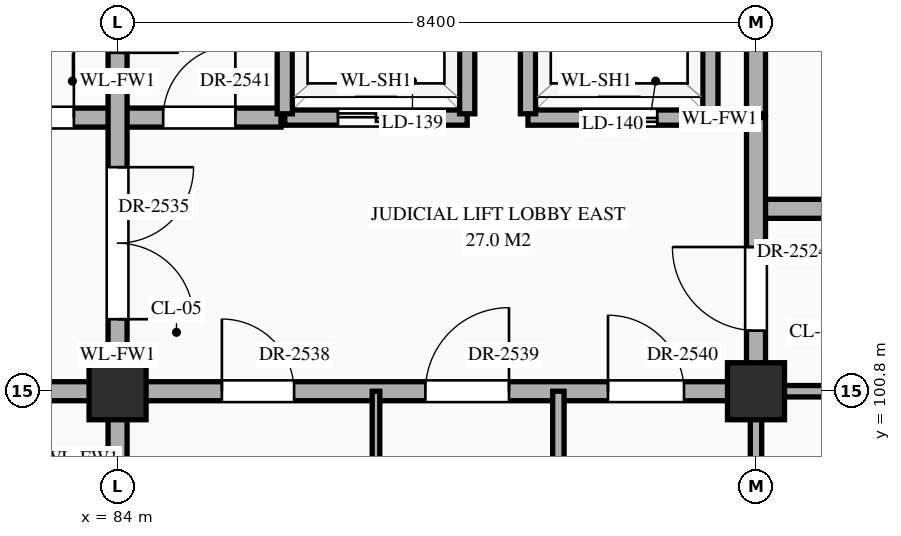
"""IFC4 building model, lengths in metres.
Left out: names, types, materials, properties, quantities, classifications, styles, units other than length and angle.
Written with IfcOpenShell. Run it as: python <this file> out.ifc"""

import sys

from ifc_helpers import new_model, si_unit, direction, frame, frame_2d, origin, origin_2d, place, context, subcontext, project, spatial, rectangle, extrude, element, fill, save


model = new_model("IFC4")
c1 = context("Model", 3, precision=1e-05, world=origin(), true_north=direction((0.0, 1.0)))
c2 = subcontext(c1, "Body", "Model", "MODEL_VIEW")
j1 = project(units=[si_unit("LENGTHUNIT", "METRE"), si_unit("PLANEANGLEUNIT", "RADIAN")], contexts=[c1])
p1 = place(None, origin())
s1 = spatial("IfcSite", under=j1, at=p1, CompositionType="ELEMENT")
p2 = place(p1, origin())
s2 = spatial("IfcBuilding", under=s1, at=p2, CompositionType="ELEMENT")
p3 = place(p2, frame((0.0, 0.0, 35.1)))
s3 = spatial("IfcBuildingStorey", under=s2, at=p3, CompositionType="ELEMENT", Elevation=35.1)
for number, where, z_axis, x_axis in (
    (1, (84.0, 100.8, 0.0), (0.0, 0.0, 1.0), (1.0, 0.0, 0.0)),
    (2, (92.4, 100.8, 0.0), (0.0, 0.0, 1.0), (1.0, 0.0, 0.0)),
):
    element("IfcColumn", number, at=place(p3, frame(where, z_axis=z_axis, x_axis=x_axis)), inside=s3, PredefinedType="COLUMN", context=c2, shape_type="SweptSolid", body=[
        extrude(rectangle(XDim=0.75, YDim=0.75, at=origin_2d()), origin(), (0.0, 0.0, 1.0), 4.2),
    ])
p4 = place(p3, frame((75.6, 100.8, 0.0), z_axis=(0.0, 0.0, 1.0), x_axis=(1.0, 0.0, 0.0)))
e3 = element("IfcWall", 3, at=p4, inside=s3, PredefinedType="STANDARD", context=c2, shape_type="SweptSolid", body=[
    extrude(rectangle(XDim=16.8, YDim=0.25, at=frame_2d((8.4, 0.0))), origin(), (0.0, 0.0, 1.0), 3.1),
])
p5 = place(p4, frame((3.65, 0.0, 0.0)))
e4 = element("IfcOpeningElement", 4, at=p5, cuts=e3, PredefinedType="OPENING", context=c2, shape_type="SweptSolid", body=[
    extrude(rectangle(XDim=1.1, YDim=2.2, at=frame_2d((0.55, 1.1))), frame((0.0, 0.137, 0.0), z_axis=(0.0, -1.0, 0.0), x_axis=(1.0, 0.0, 0.0)), (0.0, 0.0, 1.0), 0.274),
])
p6 = place(p4, frame((9.772, 0.0, 0.0)))
e5 = element("IfcOpeningElement", 5, at=p6, cuts=e3, PredefinedType="OPENING", context=c2, shape_type="SweptSolid", body=[
    extrude(rectangle(XDim=0.95, YDim=2.15, at=frame_2d((0.475, 1.075))), frame((0.0, 0.137, 0.0), z_axis=(0.0, -1.0, 0.0), x_axis=(1.0, 0.0, 0.0)), (0.0, 0.0, 1.0), 0.274),
])
p7 = place(p4, frame((12.45, 0.0, 0.0)))
e6 = element("IfcOpeningElement", 6, at=p7, cuts=e3, PredefinedType="OPENING", context=c2, shape_type="SweptSolid", body=[
    extrude(rectangle(XDim=1.1, YDim=2.2, at=frame_2d((0.55, 1.1))), frame((0.0, 0.137, 0.0), z_axis=(0.0, -1.0, 0.0), x_axis=(1.0, 0.0, 0.0)), (0.0, 0.0, 1.0), 0.274),
])
p8 = place(p4, frame((14.853, 0.0, 0.0)))
e7 = element("IfcOpeningElement", 7, at=p8, cuts=e3, PredefinedType="OPENING", context=c2, shape_type="SweptSolid", body=[
    extrude(rectangle(XDim=1.0, YDim=2.2, at=frame_2d((0.5, 1.1))), frame((0.0, 0.137, 0.0), z_axis=(0.0, -1.0, 0.0), x_axis=(1.0, 0.0, 0.0)), (0.0, 0.0, 1.0), 0.274),
])
p9 = place(p3, frame((92.4, 100.8, 0.0), z_axis=(0.0, 0.0, 1.0), x_axis=(1.0, 0.0, 0.0)))
e8 = element("IfcWall", 8, at=p9, inside=s3, PredefinedType="STANDARD", context=c2, shape_type="SweptSolid", body=[
    extrude(rectangle(XDim=4.2, YDim=0.15, at=frame_2d((2.1, 0.0))), origin(), (0.0, 0.0, 1.0), 3.1),
])
p10 = place(p9, frame((1.798, 0.0, 0.0)))
e9 = element("IfcOpeningElement", 9, at=p10, cuts=e8, PredefinedType="OPENING", context=c2, shape_type="SweptSolid", body=[
    extrude(rectangle(XDim=0.9, YDim=2.15, at=frame_2d((0.45, 1.075))), frame((0.0, 0.087, 0.0), z_axis=(0.0, -1.0, 0.0), x_axis=(1.0, 0.0, 0.0)), (0.0, 0.0, 1.0), 0.174),
])
p11 = place(p3, frame((92.4, 103.2, 0.0), z_axis=(0.0, 0.0, 1.0), x_axis=(1.0, 0.0, 0.0)))
e10 = element("IfcWall", 10, at=p11, inside=s3, PredefinedType="STANDARD", context=c2, shape_type="SweptSolid", body=[
    extrude(rectangle(XDim=4.2, YDim=0.25, at=frame_2d((2.1, 0.0))), origin(), (0.0, 0.0, 1.0), 3.95),
])
p12 = place(p11, frame((1.6, 0.0, 0.0)))
e11 = element("IfcOpeningElement", 11, at=p12, cuts=e10, PredefinedType="OPENING", context=c2, shape_type="SweptSolid", body=[
    extrude(rectangle(XDim=1.0, YDim=2.2, at=frame_2d((0.5, 1.1))), frame((0.0, 0.137, 0.0), z_axis=(0.0, -1.0, 0.0), x_axis=(1.0, 0.0, 0.0)), (0.0, 0.0, 1.0), 0.274),
])
p13 = place(p3, frame((81.85, 104.4, 0.0), z_axis=(0.0, 0.0, 1.0), x_axis=(1.0, 0.0, 0.0)))
e12 = element("IfcWall", 12, at=p13, inside=s3, PredefinedType="STANDARD", context=c2, shape_type="SweptSolid", body=[
    extrude(rectangle(XDim=4.3, YDim=0.25, at=frame_2d((2.15, 0.0))), origin(), (0.0, 0.0, 1.0), 3.95),
])
p14 = place(p13, frame((0.575, 0.0, 0.0)))
e13 = element("IfcOpeningElement", 13, at=p14, cuts=e12, PredefinedType="OPENING", context=c2, shape_type="SweptSolid", body=[
    extrude(rectangle(XDim=1.0, YDim=2.2, at=frame_2d((0.5, 1.1))), frame((0.0, 0.137, 0.0), z_axis=(0.0, -1.0, 0.0), x_axis=(1.0, 0.0, 0.0)), (0.0, 0.0, 1.0), 0.274),
])
p15 = place(p13, frame((2.75, 0.0, 0.0)))
e14 = element("IfcOpeningElement", 14, at=p15, cuts=e12, PredefinedType="OPENING", context=c2, shape_type="SweptSolid", body=[
    extrude(rectangle(XDim=0.95, YDim=2.15, at=frame_2d((0.475, 1.075))), frame((0.0, 0.137, 0.0), z_axis=(0.0, -1.0, 0.0), x_axis=(1.0, 0.0, 0.0)), (0.0, 0.0, 1.0), 0.274),
])
p16 = place(p3, frame((86.2, 104.4, 0.0), z_axis=(0.0, 0.0, 1.0), x_axis=(1.0, 0.0, 0.0)))
e15 = element("IfcWall", 15, at=p16, inside=s3, PredefinedType="STANDARD", context=c2, shape_type="SweptSolid", body=[
    extrude(rectangle(XDim=2.4, YDim=0.2, at=frame_2d((1.2, 0.0))), origin(), (0.0, 0.0, 1.0), 3.95),
])
p17 = place(p16, frame((0.7, 0.0, 0.0)))
e16 = element("IfcOpeningElement", 16, at=p17, cuts=e15, PredefinedType="OPENING", context=c2, shape_type="SweptSolid", body=[
    extrude(rectangle(XDim=1.0, YDim=2.15, at=frame_2d((0.5, 1.075))), frame((0.0, 0.112, 0.0), z_axis=(0.0, -1.0, 0.0), x_axis=(1.0, 0.0, 0.0)), (0.0, 0.0, 1.0), 0.224),
])
p18 = place(p3, frame((89.4, 104.4, 0.0), z_axis=(0.0, 0.0, 1.0), x_axis=(1.0, 0.0, 0.0)))
e17 = element("IfcWall", 17, at=p18, inside=s3, PredefinedType="STANDARD", context=c2, shape_type="SweptSolid", body=[
    extrude(rectangle(XDim=2.4, YDim=0.2, at=frame_2d((1.2, 0.0))), origin(), (0.0, 0.0, 1.0), 3.95),
])
p19 = place(p18, frame((0.7, 0.0, 0.0)))
e18 = element("IfcOpeningElement", 18, at=p19, cuts=e17, PredefinedType="OPENING", context=c2, shape_type="SweptSolid", body=[
    extrude(rectangle(XDim=1.0, YDim=2.15, at=frame_2d((0.5, 1.075))), frame((0.0, 0.112, 0.0), z_axis=(0.0, -1.0, 0.0), x_axis=(1.0, 0.0, 0.0)), (0.0, 0.0, 1.0), 0.224),
])
p20 = place(p3, frame((84.0, 84.65, 0.0), z_axis=(0.0, 0.0, 1.0), x_axis=(0.0, 1.0, 0.0)))
e19 = element("IfcWall", 19, at=p20, inside=s3, PredefinedType="STANDARD", context=c2, shape_type="SweptSolid", body=[
    extrude(rectangle(XDim=30.51, YDim=0.25, at=frame_2d((15.255, 0.0))), origin(), (0.0, 0.0, 1.0), 3.2),
])
p21 = place(p20, frame((17.097, 0.0, 0.0)))
e20 = element("IfcOpeningElement", 20, at=p21, cuts=e19, PredefinedType="OPENING", context=c2, shape_type="SweptSolid", body=[
    extrude(rectangle(XDim=2.0, YDim=2.4, at=frame_2d((1.0, 1.2))), frame((0.0, 0.137, 0.0), z_axis=(0.0, -1.0, 0.0), x_axis=(1.0, 0.0, 0.0)), (0.0, 0.0, 1.0), 0.274),
])
p22 = place(p20, frame((7.127, 0.0, 0.0)))
e21 = element("IfcOpeningElement", 21, at=p22, cuts=e19, PredefinedType="OPENING", context=c2, shape_type="SweptSolid", body=[
    extrude(rectangle(XDim=0.95, YDim=2.15, at=frame_2d((0.475, 1.075))), frame((0.0, 0.137, 0.0), z_axis=(0.0, -1.0, 0.0), x_axis=(1.0, 0.0, 0.0)), (0.0, 0.0, 1.0), 0.274),
])
p23 = place(p20, frame((9.823, 0.0, 0.0)))
e22 = element("IfcOpeningElement", 22, at=p23, cuts=e19, PredefinedType="OPENING", context=c2, shape_type="SweptSolid", body=[
    extrude(rectangle(XDim=0.95, YDim=2.15, at=frame_2d((0.475, 1.075))), frame((0.0, 0.137, 0.0), z_axis=(0.0, -1.0, 0.0), x_axis=(1.0, 0.0, 0.0)), (0.0, 0.0, 1.0), 0.274),
])
p24 = place(p20, frame((20.603, 0.0, 0.0)))
e23 = element("IfcOpeningElement", 23, at=p24, cuts=e19, PredefinedType="OPENING", context=c2, shape_type="SweptSolid", body=[
    extrude(rectangle(XDim=1.6, YDim=2.3, at=frame_2d((0.8, 1.15))), frame((0.0, 0.137, 0.0), z_axis=(0.0, -1.0, 0.0), x_axis=(1.0, 0.0, 0.0)), (0.0, 0.0, 1.0), 0.274),
])
p25 = place(p20, frame((23.873, 0.0, 0.0)))
e24 = element("IfcOpeningElement", 24, at=p25, cuts=e19, PredefinedType="OPENING", context=c2, shape_type="SweptSolid", body=[
    extrude(rectangle(XDim=1.0, YDim=2.2, at=frame_2d((0.5, 1.1))), frame((0.0, 0.137, 0.0), z_axis=(0.0, -1.0, 0.0), x_axis=(1.0, 0.0, 0.0)), (0.0, 0.0, 1.0), 0.274),
])
p26 = place(p20, frame((0.228, 0.0, 0.0)))
e25 = element("IfcOpeningElement", 25, at=p26, cuts=e19, PredefinedType="OPENING", context=c2, shape_type="SweptSolid", body=[
    extrude(rectangle(XDim=1.0, YDim=2.2, at=frame_2d((0.5, 1.1))), frame((0.0, 0.137, 0.0), z_axis=(0.0, -1.0, 0.0), x_axis=(1.0, 0.0, 0.0)), (0.0, 0.0, 1.0), 0.274),
])
p27 = place(p3, frame((86.2, 104.45, 0.0), z_axis=(0.0, 0.0, 1.0), x_axis=(0.0, 1.0, 0.0)))
e26 = element("IfcWall", 26, at=p27, inside=s3, PredefinedType="STANDARD", context=c2, shape_type="SweptSolid", body=[
    extrude(rectangle(XDim=2.3, YDim=0.2, at=frame_2d((1.15, 0.0))), origin(), (0.0, 0.0, 1.0), 3.95),
])
p28 = place(p3, frame((87.4, 96.0, 0.0), z_axis=(0.0, 0.0, 1.0), x_axis=(0.0, 1.0, 0.0)))
e27 = element("IfcWall", 27, at=p28, inside=s3, PredefinedType="STANDARD", context=c2, shape_type="SweptSolid", body=[
    extrude(rectangle(XDim=4.8, YDim=0.1, at=frame_2d((2.4, 0.0))), origin(), (0.0, 0.0, 1.0), 3.95),
])
p29 = place(p28, frame((1.95, 0.0, 0.0)))
e28 = element("IfcOpeningElement", 28, at=p29, cuts=e27, PredefinedType="OPENING", context=c2, shape_type="SweptSolid", body=[
    extrude(rectangle(XDim=0.9, YDim=2.15, at=frame_2d((0.45, 1.075))), frame((0.0, 0.062, 0.0), z_axis=(0.0, -1.0, 0.0), x_axis=(1.0, 0.0, 0.0)), (0.0, 0.0, 1.0), 0.124),
])
for number, where, z_axis, x_axis in (
    (29, (88.6, 104.45, 0.0), (0.0, 0.0, 1.0), (0.0, 1.0, 0.0)),
    (30, (89.4, 104.45, 0.0), (0.0, 0.0, 1.0), (0.0, 1.0, 0.0)),
):
    element("IfcWall", number, at=place(p3, frame(where, z_axis=z_axis, x_axis=x_axis)), inside=s3, PredefinedType="STANDARD", context=c2, shape_type="SweptSolid", body=[
        extrude(rectangle(XDim=2.3, YDim=0.2, at=frame_2d((1.15, 0.0))), origin(), (0.0, 0.0, 1.0), 3.95),
    ])
p30 = place(p3, frame((89.8, 96.0, 0.0), z_axis=(0.0, 0.0, 1.0), x_axis=(0.0, 1.0, 0.0)))
e31 = element("IfcWall", 31, at=p30, inside=s3, PredefinedType="STANDARD", context=c2, shape_type="SweptSolid", body=[
    extrude(rectangle(XDim=4.8, YDim=0.15, at=frame_2d((2.4, 0.0))), origin(), (0.0, 0.0, 1.0), 3.95),
])
p31 = place(p30, frame((1.97, 0.0, 0.0)))
e32 = element("IfcOpeningElement", 32, at=p31, cuts=e31, PredefinedType="OPENING", context=c2, shape_type="SweptSolid", body=[
    extrude(rectangle(XDim=0.86, YDim=2.1, at=frame_2d((0.43, 1.05))), frame((0.0, 0.087, 0.0), z_axis=(0.0, -1.0, 0.0), x_axis=(1.0, 0.0, 0.0)), (0.0, 0.0, 1.0), 0.174),
])
p32 = place(p3, frame((91.8, 104.45, 0.0), z_axis=(0.0, 0.0, 1.0), x_axis=(0.0, 1.0, 0.0)))
e33 = element("IfcWall", 33, at=p32, inside=s3, PredefinedType="STANDARD", context=c2, shape_type="SweptSolid", body=[
    extrude(rectangle(XDim=2.3, YDim=0.2, at=frame_2d((1.15, 0.0))), origin(), (0.0, 0.0, 1.0), 3.95),
])
p33 = place(p3, frame((92.4, 96.0, 0.0), z_axis=(0.0, 0.0, 1.0), x_axis=(0.0, 1.0, 0.0)))
e34 = element("IfcWall", 34, at=p33, inside=s3, PredefinedType="STANDARD", context=c2, shape_type="SweptSolid", body=[
    extrude(rectangle(XDim=4.8, YDim=0.15, at=frame_2d((2.4, 0.0))), origin(), (0.0, 0.0, 1.0), 3.2),
])
p34 = place(p3, frame((92.4, 100.8, 0.0), z_axis=(0.0, 0.0, 1.0), x_axis=(0.0, 1.0, 0.0)))
e35 = element("IfcWall", 35, at=p34, inside=s3, PredefinedType="STANDARD", context=c2, shape_type="SweptSolid", body=[
    extrude(rectangle(XDim=3.6, YDim=0.25, at=frame_2d((1.8, 0.0))), origin(), (0.0, 0.0, 1.0), 3.2),
])
p35 = place(p34, frame((0.798, 0.0, 0.0)))
e36 = element("IfcOpeningElement", 36, at=p35, cuts=e35, PredefinedType="OPENING", context=c2, shape_type="SweptSolid", body=[
    extrude(rectangle(XDim=1.1, YDim=2.2, at=frame_2d((0.55, 1.1))), frame((0.0, 0.137, 0.0), z_axis=(0.0, -1.0, 0.0), x_axis=(1.0, 0.0, 0.0)), (0.0, 0.0, 1.0), 0.274),
])
p36 = place(p3, frame((92.4, 104.45, 0.0), z_axis=(0.0, 0.0, 1.0), x_axis=(0.0, 1.0, 0.0)))
e37 = element("IfcWall", 37, at=p36, inside=s3, PredefinedType="STANDARD", context=c2, shape_type="SweptSolid", body=[
    extrude(rectangle(XDim=3.5, YDim=0.25, at=frame_2d((1.75, 0.0))), origin(), (0.0, 0.0, 1.0), 3.2),
])
p37 = place(p17, origin())
e38 = element("IfcDoor", 38, at=p37, inside=s3, OperationType="DOUBLE_DOOR_SLIDING", PredefinedType="DOOR", context=c2, shape_type="SweptSolid", body=[
    extrude(rectangle(XDim=1.0, YDim=2.15, at=frame_2d((0.5, 1.075))), frame((0.0, 0.025, 0.0), z_axis=(0.0, -1.0, 0.0), x_axis=(1.0, 0.0, 0.0)), (0.0, 0.0, 1.0), 0.05),
])
fill(e16, e38)
p38 = place(p19, origin())
e39 = element("IfcDoor", 39, at=p38, inside=s3, OperationType="DOUBLE_DOOR_SLIDING", PredefinedType="DOOR", context=c2, shape_type="SweptSolid", body=[
    extrude(rectangle(XDim=1.0, YDim=2.15, at=frame_2d((0.5, 1.075))), frame((0.0, 0.025, 0.0), z_axis=(0.0, -1.0, 0.0), x_axis=(1.0, 0.0, 0.0)), (0.0, 0.0, 1.0), 0.05),
])
fill(e18, e39)
p39 = place(p35, origin())
e40 = element("IfcDoor", 40, at=p39, inside=s3, OperationType="SINGLE_SWING_RIGHT", PredefinedType="DOOR", context=c2, shape_type="SweptSolid", body=[
    extrude(rectangle(XDim=1.1, YDim=2.2, at=frame_2d((0.55, 1.1))), frame((0.0, 0.025, 0.0), z_axis=(0.0, -1.0, 0.0), x_axis=(1.0, 0.0, 0.0)), (0.0, 0.0, 1.0), 0.05),
])
fill(e36, e40)
p40 = place(p21, frame((2.0, 0.0, 0.0), z_axis=(0.0, 0.0, 1.0), x_axis=(-1.0, 0.0, 0.0)))
e41 = element("IfcDoor", 41, at=p40, inside=s3, OperationType="DOUBLE_DOOR_SINGLE_SWING", PredefinedType="DOOR", context=c2, shape_type="SweptSolid", body=[
    extrude(rectangle(XDim=2.0, YDim=2.4, at=frame_2d((1.0, 1.2))), frame((0.0, 0.025, 0.0), z_axis=(0.0, -1.0, 0.0), x_axis=(1.0, 0.0, 0.0)), (0.0, 0.0, 1.0), 0.05),
])
fill(e20, e41)
p41 = place(p14, origin())
e42 = element("IfcDoor", 42, at=p41, inside=s3, OperationType="SINGLE_SWING_RIGHT", PredefinedType="DOOR", context=c2, shape_type="SweptSolid", body=[
    extrude(rectangle(XDim=1.0, YDim=2.2, at=frame_2d((0.5, 1.1))), frame((0.0, 0.025, 0.0), z_axis=(0.0, -1.0, 0.0), x_axis=(1.0, 0.0, 0.0)), (0.0, 0.0, 1.0), 0.05),
])
fill(e13, e42)
p42 = place(p6, origin())
e43 = element("IfcDoor", 43, at=p42, inside=s3, OperationType="SINGLE_SWING_LEFT", PredefinedType="DOOR", context=c2, shape_type="SweptSolid", body=[
    extrude(rectangle(XDim=0.95, YDim=2.15, at=frame_2d((0.475, 1.075))), frame((0.0, 0.025, 0.0), z_axis=(0.0, -1.0, 0.0), x_axis=(1.0, 0.0, 0.0)), (0.0, 0.0, 1.0), 0.05),
])
fill(e5, e43)
p43 = place(p7, origin())
e44 = element("IfcDoor", 44, at=p43, inside=s3, OperationType="SINGLE_SWING_RIGHT", PredefinedType="DOOR", context=c2, shape_type="SweptSolid", body=[
    extrude(rectangle(XDim=1.1, YDim=2.2, at=frame_2d((0.55, 1.1))), frame((0.0, 0.025, 0.0), z_axis=(0.0, -1.0, 0.0), x_axis=(1.0, 0.0, 0.0)), (0.0, 0.0, 1.0), 0.05),
])
fill(e6, e44)
p44 = place(p8, origin())
e45 = element("IfcDoor", 45, at=p44, inside=s3, OperationType="SINGLE_SWING_LEFT", PredefinedType="DOOR", context=c2, shape_type="SweptSolid", body=[
    extrude(rectangle(XDim=1.0, YDim=2.2, at=frame_2d((0.5, 1.1))), frame((0.0, 0.025, 0.0), z_axis=(0.0, -1.0, 0.0), x_axis=(1.0, 0.0, 0.0)), (0.0, 0.0, 1.0), 0.05),
])
fill(e7, e45)
p45 = place(p15, origin())
e46 = element("IfcDoor", 46, at=p45, inside=s3, OperationType="SINGLE_SWING_RIGHT", PredefinedType="DOOR", context=c2, shape_type="SweptSolid", body=[
    extrude(rectangle(XDim=0.95, YDim=2.15, at=frame_2d((0.475, 1.075))), frame((0.0, 0.025, 0.0), z_axis=(0.0, -1.0, 0.0), x_axis=(1.0, 0.0, 0.0)), (0.0, 0.0, 1.0), 0.05),
])
fill(e14, e46)
p46 = place(p24, frame((1.6, 0.0, 0.0), z_axis=(0.0, 0.0, 1.0), x_axis=(-1.0, 0.0, 0.0)))
e47 = element("IfcDoor", 47, at=p46, inside=s3, OperationType="DOUBLE_DOOR_SINGLE_SWING", PredefinedType="DOOR", context=c2, shape_type="SweptSolid", body=[
    extrude(rectangle(XDim=1.6, YDim=2.3, at=frame_2d((0.8, 1.15))), frame((0.0, 0.025, 0.0), z_axis=(0.0, -1.0, 0.0), x_axis=(1.0, 0.0, 0.0)), (0.0, 0.0, 1.0), 0.05),
])
fill(e23, e47)
save(model, sys.argv[1])
